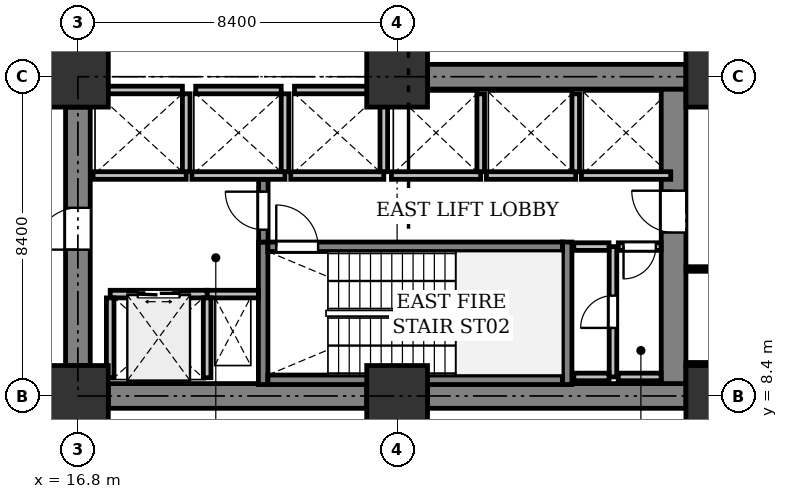
"""IFC4 building model, lengths in metres.
Left out: names, types, materials, properties, quantities, classifications, styles, units other than length and angle.
Written with IfcOpenShell. Run it as: python <this file> out.ifc"""

import sys

from ifc_helpers import new_model, si_unit, direction, frame, frame_2d, origin, origin_2d, place, context, subcontext, project, spatial, rectangle, extrude, element, fill, save


model = new_model("IFC4")
c1 = context("Model", 3, precision=1e-05, world=origin(), true_north=direction((0.0, 1.0)))
c2 = subcontext(c1, "Body", "Model", "MODEL_VIEW")
j1 = project(units=[si_unit("LENGTHUNIT", "METRE"), si_unit("PLANEANGLEUNIT", "RADIAN")], contexts=[c1])
p1 = place(None, origin())
s1 = spatial("IfcSite", under=j1, at=p1, CompositionType="ELEMENT")
p2 = place(p1, origin())
s2 = spatial("IfcBuilding", under=s1, at=p2, CompositionType="ELEMENT")
p3 = place(p2, frame((0.0, 0.0, 5.4)))
s3 = spatial("IfcBuildingStorey", under=s2, at=p3, CompositionType="ELEMENT", Elevation=5.4)
for number, where, z_axis, x_axis in (
    (1, (16.8, 8.4, 0.0), (0.0, 0.0, 1.0), (1.0, 0.0, 0.0)),
    (2, (16.8, 16.8, 0.0), (0.0, 0.0, 1.0), (1.0, 0.0, 0.0)),
    (3, (25.2, 8.4, 0.0), (0.0, 0.0, 1.0), (1.0, 0.0, 0.0)),
    (4, (25.2, 16.8, 0.0), (0.0, 0.0, 1.0), (1.0, 0.0, 0.0)),
    (5, (33.6, 8.4, 0.0), (0.0, 0.0, 1.0), (1.0, 0.0, 0.0)),
    (6, (33.6, 16.8, 0.0), (0.0, 0.0, 1.0), (1.0, 0.0, 0.0)),
):
    element("IfcColumn", number, at=place(p3, frame(where, z_axis=z_axis, x_axis=x_axis)), inside=s3, PredefinedType="COLUMN", context=c2, shape_type="SweptSolid", body=[
        extrude(rectangle(XDim=1.6, YDim=1.6, at=origin_2d()), origin(), (0.0, 0.0, 1.0), 4.8),
    ])
p4 = place(p3, frame((17.6, 8.4, 0.0), z_axis=(0.0, 0.0, 1.0), x_axis=(1.0, 0.0, 0.0)))
e7 = element("IfcWall", 7, at=p4, inside=s3, PredefinedType="SHEAR", context=c2, shape_type="SweptSolid", body=[
    extrude(rectangle(XDim=6.8, YDim=0.65, at=frame_2d((3.4, 0.0))), origin(), (0.0, 0.0, 1.0), 4.525),
])
p5 = place(p3, frame((26.0, 8.4, 0.0), z_axis=(0.0, 0.0, 1.0), x_axis=(1.0, 0.0, 0.0)))
e8 = element("IfcWall", 8, at=p5, inside=s3, PredefinedType="SHEAR", context=c2, shape_type="SweptSolid", body=[
    extrude(rectangle(XDim=6.8, YDim=0.65, at=frame_2d((3.4, 0.0))), origin(), (0.0, 0.0, 1.0), 4.525),
])
p6 = place(p3, frame((32.475, 8.725, 0.0), z_axis=(0.0, 0.0, 1.0), x_axis=(0.0, 1.0, 0.0)))
e9 = element("IfcWall", 9, at=p6, inside=s3, PredefinedType="SHEAR", context=c2, shape_type="SweptSolid", body=[
    extrude(rectangle(XDim=7.75, YDim=0.65, at=frame_2d((3.875, 0.0))), origin(), (0.0, 0.0, 1.0), 4.525),
])
p7 = place(p6, frame((3.975, 0.0, 0.0)))
e10 = element("IfcOpeningElement", 10, at=p7, cuts=e9, PredefinedType="OPENING", context=c2, shape_type="SweptSolid", body=[
    extrude(rectangle(XDim=1.1, YDim=2.15, at=frame_2d((0.55, 1.075))), frame((0.0, 0.335, 0.0), z_axis=(0.0, -1.0, 0.0), x_axis=(1.0, 0.0, 0.0)), (0.0, 0.0, 1.0), 0.67),
])
p8 = place(p3, frame((16.8, 9.2, 0.0), z_axis=(0.0, 0.0, 1.0), x_axis=(0.0, 1.0, 0.0)))
e11 = element("IfcWall", 11, at=p8, inside=s3, PredefinedType="SHEAR", context=c2, shape_type="SweptSolid", body=[
    extrude(rectangle(XDim=6.8, YDim=0.65, at=frame_2d((3.4, 0.0))), origin(), (0.0, 0.0, 1.0), 4.525),
])
p9 = place(p8, frame((3.05, 0.0, 0.0)))
e12 = element("IfcOpeningElement", 12, at=p9, cuts=e11, PredefinedType="OPENING", context=c2, shape_type="SweptSolid", body=[
    extrude(rectangle(XDim=1.1, YDim=2.15, at=frame_2d((0.55, 1.075))), frame((0.0, 0.335, 0.0), z_axis=(0.0, -1.0, 0.0), x_axis=(1.0, 0.0, 0.0)), (0.0, 0.0, 1.0), 0.67),
])
p10 = place(p3, frame((26.0, 16.8, 0.0), z_axis=(0.0, 0.0, 1.0), x_axis=(1.0, 0.0, 0.0)))
e13 = element("IfcWall", 13, at=p10, inside=s3, PredefinedType="SHEAR", context=c2, shape_type="SweptSolid", body=[
    extrude(rectangle(XDim=6.8, YDim=0.65, at=frame_2d((3.4, 0.0))), origin(), (0.0, 0.0, 1.0), 4.525),
])
for number, where, z_axis, x_axis in (
    (14, (21.675, 8.7, 0.0), (0.0, 0.0, 1.0), (0.0, 1.0, 0.0)),
    (15, (29.675, 8.7, 0.0), (0.0, 0.0, 1.0), (0.0, 1.0, 0.0)),
):
    element("IfcWall", number, at=place(p3, frame(where, z_axis=z_axis, x_axis=x_axis)), inside=s3, PredefinedType="SHEAR", context=c2, shape_type="SweptSolid", body=[
        extrude(rectangle(XDim=3.75, YDim=0.25, at=frame_2d((1.875, 0.0))), origin(), (0.0, 0.0, 1.0), 4.525),
    ])
p11 = place(p3, frame((21.8, 8.825, 0.0), z_axis=(0.0, 0.0, 1.0), x_axis=(1.0, 0.0, 0.0)))
e16 = element("IfcWall", 16, at=p11, inside=s3, PredefinedType="SHEAR", context=c2, shape_type="SweptSolid", body=[
    extrude(rectangle(XDim=7.75, YDim=0.25, at=frame_2d((3.875, 0.0))), origin(), (0.0, 0.0, 1.0), 4.525),
])
p12 = place(p3, frame((21.8, 12.325, 0.0), z_axis=(0.0, 0.0, 1.0), x_axis=(1.0, 0.0, 0.0)))
e17 = element("IfcWall", 17, at=p12, inside=s3, PredefinedType="SHEAR", context=c2, shape_type="SweptSolid", body=[
    extrude(rectangle(XDim=7.75, YDim=0.25, at=frame_2d((3.875, 0.0))), origin(), (0.0, 0.0, 1.0), 4.525),
])
p13 = place(p12, frame((0.22, 0.0, 0.0)))
e18 = element("IfcOpeningElement", 18, at=p13, cuts=e17, PredefinedType="OPENING", context=c2, shape_type="SweptSolid", body=[
    extrude(rectangle(XDim=1.1, YDim=2.15, at=frame_2d((0.55, 1.075))), frame((0.0, 0.135, 0.0), z_axis=(0.0, -1.0, 0.0), x_axis=(1.0, 0.0, 0.0)), (0.0, 0.0, 1.0), 0.27),
])
p14 = place(p3, frame((20.2, 11.08, 0.0), z_axis=(0.0, 0.0, 1.0), x_axis=(1.0, 0.0, 0.0)))
e19 = element("IfcWall", 19, at=p14, inside=s3, PredefinedType="PARTITIONING", context=c2, shape_type="SweptSolid", body=[
    extrude(rectangle(XDim=1.35, YDim=0.2, at=frame_2d((0.675, 0.0))), origin(), (0.0, 0.0, 1.0), 4.525),
])
p15 = place(p3, frame((21.68, 12.45, 0.0), z_axis=(0.0, 0.0, 1.0), x_axis=(0.0, 1.0, 0.0)))
e20 = element("IfcWall", 20, at=p15, inside=s3, PredefinedType="SHEAR", context=c2, shape_type="SweptSolid", body=[
    extrude(rectangle(XDim=1.65, YDim=0.25, at=frame_2d((0.825, 0.0))), origin(), (0.0, 0.0, 1.0), 4.525),
])
p16 = place(p15, frame((0.325, 0.0, 0.0)))
e21 = element("IfcOpeningElement", 21, at=p16, cuts=e20, PredefinedType="OPENING", context=c2, shape_type="SweptSolid", body=[
    extrude(rectangle(XDim=1.0, YDim=2.15, at=frame_2d((0.5, 1.075))), frame((0.0, 0.135, 0.0), z_axis=(0.0, -1.0, 0.0), x_axis=(1.0, 0.0, 0.0)), (0.0, 0.0, 1.0), 0.27),
])
p17 = place(p3, frame((17.65, 11.08, 0.0), z_axis=(0.0, 0.0, 1.0), x_axis=(1.0, 0.0, 0.0)))
e22 = element("IfcWall", 22, at=p17, inside=s3, PredefinedType="PARTITIONING", context=c2, shape_type="SweptSolid", body=[
    extrude(rectangle(XDim=2.55, YDim=0.2, at=frame_2d((1.275, 0.0))), origin(), (0.0, 0.0, 1.0), 4.525),
])
p18 = place(p17, frame((0.725, 0.0, 0.0)))
e23 = element("IfcOpeningElement", 23, at=p18, cuts=e22, PredefinedType="OPENING", context=c2, shape_type="SweptSolid", body=[
    extrude(rectangle(XDim=1.1, YDim=2.2, at=frame_2d((0.55, 1.1))), frame((0.0, 0.11, 0.0), z_axis=(0.0, -1.0, 0.0), x_axis=(1.0, 0.0, 0.0)), (0.0, 0.0, 1.0), 0.22),
])
for number, where, z_axis, x_axis in (
    (24, (20.2, 8.88, 0.0), (0.0, 0.0, 1.0), (0.0, 1.0, 0.0)),
    (25, (17.65, 8.88, 0.0), (0.0, 0.0, 1.0), (0.0, 1.0, 0.0)),
):
    element("IfcWall", number, at=place(p3, frame(where, z_axis=z_axis, x_axis=x_axis)), inside=s3, PredefinedType="PARTITIONING", context=c2, shape_type="SweptSolid", body=[
        extrude(rectangle(XDim=2.1, YDim=0.2, at=frame_2d((1.05, 0.0))), origin(), (0.0, 0.0, 1.0), 4.525),
    ])
p19 = place(p3, frame((17.2, 14.2, 0.0), z_axis=(0.0, 0.0, 1.0), x_axis=(1.0, 0.0, 0.0)))
e26 = element("IfcWall", 26, at=p19, inside=s3, PredefinedType="PARTITIONING", context=c2, shape_type="SweptSolid", body=[
    extrude(rectangle(XDim=2.45, YDim=0.2, at=frame_2d((1.225, 0.0))), origin(), (0.0, 0.0, 1.0), 4.525),
])
p20 = place(p3, frame((19.65, 14.3, 0.0), z_axis=(0.0, 0.0, 1.0), x_axis=(0.0, 1.0, 0.0)))
e27 = element("IfcWall", 27, at=p20, inside=s3, PredefinedType="PARTITIONING", context=c2, shape_type="SweptSolid", body=[
    extrude(rectangle(XDim=2.05, YDim=0.2, at=frame_2d((1.025, 0.0))), origin(), (0.0, 0.0, 1.0), 4.525),
])
p21 = place(p3, frame((17.3, 16.45, 0.0), z_axis=(0.0, 0.0, 1.0), x_axis=(1.0, 0.0, 0.0)))
e28 = element("IfcWall", 28, at=p21, inside=s3, PredefinedType="PARTITIONING", context=c2, shape_type="SweptSolid", body=[
    extrude(rectangle(XDim=2.25, YDim=0.2, at=frame_2d((1.125, 0.0))), origin(), (0.0, 0.0, 1.0), 4.525),
])
p22 = place(p3, frame((19.8, 14.2, 0.0), z_axis=(0.0, 0.0, 1.0), x_axis=(1.0, 0.0, 0.0)))
e29 = element("IfcWall", 29, at=p22, inside=s3, PredefinedType="PARTITIONING", context=c2, shape_type="SweptSolid", body=[
    extrude(rectangle(XDim=2.45, YDim=0.2, at=frame_2d((1.225, 0.0))), origin(), (0.0, 0.0, 1.0), 4.525),
])
p23 = place(p3, frame((22.25, 14.3, 0.0), z_axis=(0.0, 0.0, 1.0), x_axis=(0.0, 1.0, 0.0)))
e30 = element("IfcWall", 30, at=p23, inside=s3, PredefinedType="PARTITIONING", context=c2, shape_type="SweptSolid", body=[
    extrude(rectangle(XDim=2.05, YDim=0.2, at=frame_2d((1.025, 0.0))), origin(), (0.0, 0.0, 1.0), 4.525),
])
p24 = place(p3, frame((19.9, 16.45, 0.0), z_axis=(0.0, 0.0, 1.0), x_axis=(1.0, 0.0, 0.0)))
e31 = element("IfcWall", 31, at=p24, inside=s3, PredefinedType="PARTITIONING", context=c2, shape_type="SweptSolid", body=[
    extrude(rectangle(XDim=2.25, YDim=0.2, at=frame_2d((1.125, 0.0))), origin(), (0.0, 0.0, 1.0), 4.525),
])
p25 = place(p3, frame((22.4, 14.2, 0.0), z_axis=(0.0, 0.0, 1.0), x_axis=(1.0, 0.0, 0.0)))
e32 = element("IfcWall", 32, at=p25, inside=s3, PredefinedType="PARTITIONING", context=c2, shape_type="SweptSolid", body=[
    extrude(rectangle(XDim=2.45, YDim=0.2, at=frame_2d((1.225, 0.0))), origin(), (0.0, 0.0, 1.0), 4.525),
])
p26 = place(p3, frame((24.85, 14.3, 0.0), z_axis=(0.0, 0.0, 1.0), x_axis=(0.0, 1.0, 0.0)))
e33 = element("IfcWall", 33, at=p26, inside=s3, PredefinedType="PARTITIONING", context=c2, shape_type="SweptSolid", body=[
    extrude(rectangle(XDim=2.05, YDim=0.2, at=frame_2d((1.025, 0.0))), origin(), (0.0, 0.0, 1.0), 4.525),
])
p27 = place(p3, frame((22.5, 16.45, 0.0), z_axis=(0.0, 0.0, 1.0), x_axis=(1.0, 0.0, 0.0)))
e34 = element("IfcWall", 34, at=p27, inside=s3, PredefinedType="PARTITIONING", context=c2, shape_type="SweptSolid", body=[
    extrude(rectangle(XDim=2.25, YDim=0.2, at=frame_2d((1.125, 0.0))), origin(), (0.0, 0.0, 1.0), 4.525),
])
p28 = place(p3, frame((25.05, 14.2, 0.0), z_axis=(0.0, 0.0, 1.0), x_axis=(1.0, 0.0, 0.0)))
e35 = element("IfcWall", 35, at=p28, inside=s3, PredefinedType="PARTITIONING", context=c2, shape_type="SweptSolid", body=[
    extrude(rectangle(XDim=2.35, YDim=0.2, at=frame_2d((1.175, 0.0))), origin(), (0.0, 0.0, 1.0), 4.525),
])
p29 = place(p3, frame((27.4, 14.3, 0.0), z_axis=(0.0, 0.0, 1.0), x_axis=(0.0, 1.0, 0.0)))
e36 = element("IfcWall", 36, at=p29, inside=s3, PredefinedType="PARTITIONING", context=c2, shape_type="SweptSolid", body=[
    extrude(rectangle(XDim=2.05, YDim=0.2, at=frame_2d((1.025, 0.0))), origin(), (0.0, 0.0, 1.0), 4.525),
])
p30 = place(p3, frame((27.55, 14.2, 0.0), z_axis=(0.0, 0.0, 1.0), x_axis=(1.0, 0.0, 0.0)))
e37 = element("IfcWall", 37, at=p30, inside=s3, PredefinedType="PARTITIONING", context=c2, shape_type="SweptSolid", body=[
    extrude(rectangle(XDim=2.35, YDim=0.2, at=frame_2d((1.175, 0.0))), origin(), (0.0, 0.0, 1.0), 4.525),
])
p31 = place(p3, frame((29.9, 14.3, 0.0), z_axis=(0.0, 0.0, 1.0), x_axis=(0.0, 1.0, 0.0)))
e38 = element("IfcWall", 38, at=p31, inside=s3, PredefinedType="PARTITIONING", context=c2, shape_type="SweptSolid", body=[
    extrude(rectangle(XDim=2.05, YDim=0.2, at=frame_2d((1.025, 0.0))), origin(), (0.0, 0.0, 1.0), 4.525),
])
p32 = place(p3, frame((30.05, 14.2, 0.0), z_axis=(0.0, 0.0, 1.0), x_axis=(1.0, 0.0, 0.0)))
e39 = element("IfcWall", 39, at=p32, inside=s3, PredefinedType="PARTITIONING", context=c2, shape_type="SweptSolid", body=[
    extrude(rectangle(XDim=2.35, YDim=0.2, at=frame_2d((1.175, 0.0))), origin(), (0.0, 0.0, 1.0), 4.525),
])
p33 = place(p3, frame((32.146, 12.33, 0.0), z_axis=(0.0, 0.0, 1.0), x_axis=(-1.0, 0.0, 0.0)))
e40 = element("IfcWall", 40, at=p33, inside=s3, PredefinedType="PARTITIONING", context=c2, shape_type="SweptSolid", body=[
    extrude(rectangle(XDim=2.296, YDim=0.2, at=frame_2d((1.148, 0.0))), origin(), (0.0, 0.0, 1.0), 4.525),
])
p34 = place(p33, frame((0.723, 0.0, 0.0)))
e41 = element("IfcOpeningElement", 41, at=p34, cuts=e40, PredefinedType="OPENING", context=c2, shape_type="SweptSolid", body=[
    extrude(rectangle(XDim=0.85, YDim=2.15, at=frame_2d((0.425, 1.075))), frame((0.0, 0.11, 0.0), z_axis=(0.0, -1.0, 0.0), x_axis=(1.0, 0.0, 0.0)), (0.0, 0.0, 1.0), 0.22),
])
p35 = place(p3, frame((29.85, 8.9, 0.0), z_axis=(0.0, 0.0, 1.0), x_axis=(1.0, 0.0, 0.0)))
e42 = element("IfcWall", 42, at=p35, inside=s3, PredefinedType="PARTITIONING", context=c2, shape_type="SweptSolid", body=[
    extrude(rectangle(XDim=2.296, YDim=0.2, at=frame_2d((1.148, 0.0))), origin(), (0.0, 0.0, 1.0), 4.525),
])
p36 = place(p3, frame((32.804, 9.22, 0.0), z_axis=(0.0, 0.0, 1.0), x_axis=(1.0, 0.0, 0.0)))
e43 = element("IfcWall", 43, at=p36, inside=s3, PredefinedType="PARTITIONING", context=c2, shape_type="SweptSolid", body=[
    extrude(rectangle(XDim=1.596, YDim=0.12, at=frame_2d((0.798, 0.0))), origin(), (0.0, 0.0, 1.0), 3.913),
])
p37 = place(p3, frame((20.024, 8.071, 0.0), z_axis=(0.0, 0.0, 1.0), x_axis=(0.0, -1.0, 0.0)))
e44 = element("IfcWall", 44, at=p37, inside=s3, PredefinedType="PARTITIONING", context=c2, shape_type="SweptSolid", body=[
    extrude(rectangle(XDim=7.947, YDim=0.15, at=frame_2d((3.974, 0.0))), origin(), (0.0, 0.0, 1.0), 4.525),
])
p38 = place(p3, frame((35.6, 11.74, 0.0), z_axis=(0.0, 0.0, 1.0), x_axis=(-1.0, 0.0, 0.0)))
e45 = element("IfcWall", 45, at=p38, inside=s3, PredefinedType="PARTITIONING", context=c2, shape_type="SweptSolid", body=[
    extrude(rectangle(XDim=2.796, YDim=0.12, at=frame_2d((1.398, 0.0))), origin(), (0.0, 0.0, 1.0), 3.913),
])
p39 = place(p7, origin())
e46 = element("IfcDoor", 46, at=p39, inside=s3, OperationType="SINGLE_SWING_RIGHT", PredefinedType="DOOR", context=c2, shape_type="SweptSolid", body=[
    extrude(rectangle(XDim=1.1, YDim=2.15, at=frame_2d((0.55, 1.075))), frame((0.0, 0.025, 0.0), z_axis=(0.0, -1.0, 0.0), x_axis=(1.0, 0.0, 0.0)), (0.0, 0.0, 1.0), 0.05),
])
fill(e10, e46)
p40 = place(p9, origin())
e47 = element("IfcDoor", 47, at=p40, inside=s3, OperationType="SINGLE_SWING_LEFT", PredefinedType="DOOR", context=c2, shape_type="SweptSolid", body=[
    extrude(rectangle(XDim=1.1, YDim=2.15, at=frame_2d((0.55, 1.075))), frame((0.0, 0.025, 0.0), z_axis=(0.0, -1.0, 0.0), x_axis=(1.0, 0.0, 0.0)), (0.0, 0.0, 1.0), 0.05),
])
fill(e12, e47)
p41 = place(p13, origin())
e48 = element("IfcDoor", 48, at=p41, inside=s3, OperationType="SINGLE_SWING_LEFT", PredefinedType="DOOR", context=c2, shape_type="SweptSolid", body=[
    extrude(rectangle(XDim=1.1, YDim=2.15, at=frame_2d((0.55, 1.075))), frame((0.0, 0.025, 0.0), z_axis=(0.0, -1.0, 0.0), x_axis=(1.0, 0.0, 0.0)), (0.0, 0.0, 1.0), 0.05),
])
fill(e18, e48)
p42 = place(p16, origin())
e49 = element("IfcDoor", 49, at=p42, inside=s3, OperationType="SINGLE_SWING_RIGHT", PredefinedType="DOOR", context=c2, shape_type="SweptSolid", body=[
    extrude(rectangle(XDim=1.0, YDim=2.15, at=frame_2d((0.5, 1.075))), frame((0.0, 0.025, 0.0), z_axis=(0.0, -1.0, 0.0), x_axis=(1.0, 0.0, 0.0)), (0.0, 0.0, 1.0), 0.05),
])
fill(e21, e49)
p43 = place(p18, origin())
e50 = element("IfcDoor", 50, at=p43, inside=s3, OperationType="DOUBLE_DOOR_SLIDING", PredefinedType="DOOR", context=c2, shape_type="SweptSolid", body=[
    extrude(rectangle(XDim=1.1, YDim=2.2, at=frame_2d((0.55, 1.1))), frame((0.0, 0.025, 0.0), z_axis=(0.0, -1.0, 0.0), x_axis=(1.0, 0.0, 0.0)), (0.0, 0.0, 1.0), 0.05),
])
fill(e23, e50)
p44 = place(p34, origin())
e51 = element("IfcDoor", 51, at=p44, inside=s3, OperationType="SINGLE_SWING_LEFT", PredefinedType="DOOR", context=c2, shape_type="SweptSolid", body=[
    extrude(rectangle(XDim=0.85, YDim=2.15, at=frame_2d((0.425, 1.075))), frame((0.0, 0.025, 0.0), z_axis=(0.0, -1.0, 0.0), x_axis=(1.0, 0.0, 0.0)), (0.0, 0.0, 1.0), 0.05),
])
fill(e41, e51)
save(model, sys.argv[1])
